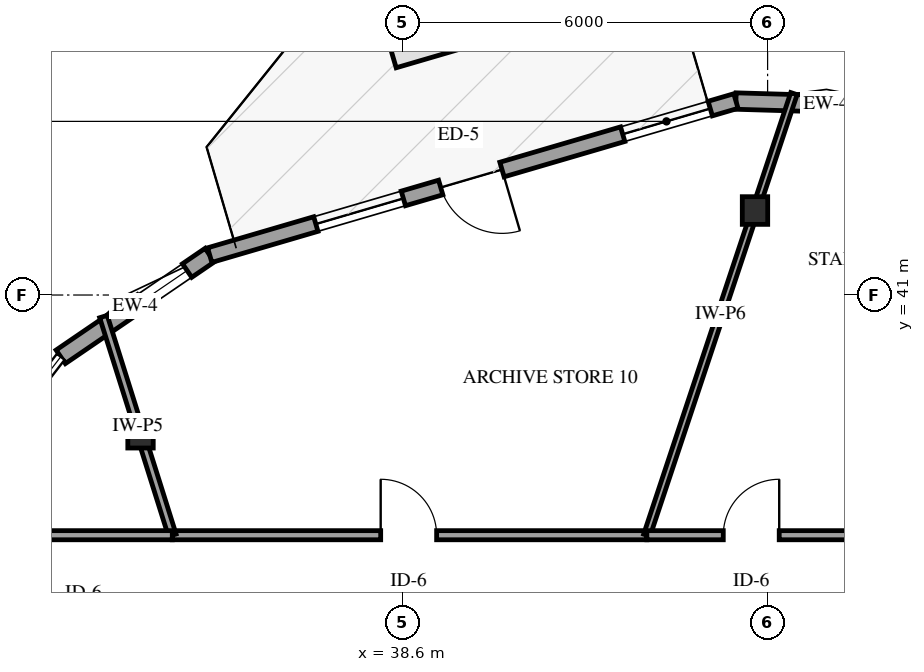
"""IFC4 building model, lengths in metres.
Left out: names, types, materials, properties, quantities, classifications, styles, units other than length and angle.
Written with IfcOpenShell. Run it as: python <this file> out.ifc"""

import sys

from ifc_helpers import new_model, si_unit, direction, frame, frame_2d, origin, origin_2d, place, context, subcontext, project, spatial, rectangle, i_section, extrude, element, fill, save


model = new_model("IFC4")
c1 = context("Model", 3, precision=1e-05, world=origin(), true_north=direction((0.0, 1.0)))
c2 = subcontext(c1, "Body", "Model", "MODEL_VIEW")
j1 = project(units=[si_unit("LENGTHUNIT", "METRE"), si_unit("PLANEANGLEUNIT", "RADIAN")], contexts=[c1])
p1 = place(None, origin())
s1 = spatial("IfcSite", under=j1, at=p1, CompositionType="ELEMENT")
p2 = place(p1, origin())
s2 = spatial("IfcBuilding", under=s1, at=p2, CompositionType="ELEMENT")
p3 = place(p2, frame((0.0, 0.0, 91.3)))
s3 = spatial("IfcBuildingStorey", under=s2, at=p3, CompositionType="ELEMENT", Elevation=91.3)
for number, where, z_axis, x_axis in (
    (1, (44.393, 42.389, 0.0), (0.0, 0.0, 1.0), (1.0, 0.0, 0.0)),
    (2, (34.288, 38.711, 0.0), (0.0, 0.0, 1.0), (1.0, 0.0, 0.0)),
):
    element("IfcColumn", number, at=place(p3, frame(where, z_axis=z_axis, x_axis=x_axis)), inside=s3, PredefinedType="COLUMN", context=c2, shape_type="SweptSolid", body=[
        extrude(i_section(OverallWidth=0.418, OverallDepth=0.455, WebThickness=0.042, FlangeThickness=0.068, FilletRadius=0.038, at=origin_2d()), origin(), (0.0, 0.0, 1.0), 3.9),
    ])
p4 = place(p3, frame((47.044, 44.103, 0.0), z_axis=(0.0, 0.0, 1.0), x_axis=(-0.999570736723, 0.029297479193, 0.0)))
e3 = element("IfcWall", 3, at=p4, inside=s3, PredefinedType="SOLIDWALL", context=c2, shape_type="SweptSolid", body=[
    extrude(rectangle(XDim=2.967, YDim=0.27, at=frame_2d((1.483, 0.0))), origin(), (0.0, 0.0, 1.0), 2.979),
])
p5 = place(p4, frame((0.45, 0.0, 0.75)))
e4 = element("IfcOpeningElement", 4, at=p5, cuts=e3, PredefinedType="OPENING", context=c2, shape_type="SweptSolid", body=[
    extrude(rectangle(XDim=0.9, YDim=1.5, at=frame_2d((0.45, 0.75))), frame((0.0, 0.145, 0.0), z_axis=(0.0, -1.0, 0.0), x_axis=(1.0, 0.0, 0.0)), (0.0, 0.0, 1.0), 0.29),
])
p6 = place(p3, frame((35.425, 41.656, 0.0), z_axis=(0.0, 0.0, 1.0), x_axis=(-0.825884174717, -0.563839808768, 0.0)))
e5 = element("IfcWall", 5, at=p6, inside=s3, PredefinedType="SOLIDWALL", context=c2, shape_type="SweptSolid", body=[
    extrude(rectangle(XDim=2.967, YDim=0.27, at=frame_2d((1.483, 0.0))), origin(), (0.0, 0.0, 1.0), 2.979),
])
p7 = place(p6, frame((0.45, 0.0, 0.75)))
e6 = element("IfcOpeningElement", 6, at=p7, cuts=e5, PredefinedType="OPENING", context=c2, shape_type="SweptSolid", body=[
    extrude(rectangle(XDim=0.9, YDim=1.5, at=frame_2d((0.45, 0.75))), frame((0.0, 0.145, 0.0), z_axis=(0.0, -1.0, 0.0), x_axis=(1.0, 0.0, 0.0)), (0.0, 0.0, 1.0), 0.29),
])
p8 = place(p3, frame((44.079, 44.19, 0.0), z_axis=(0.0, 0.0, 1.0), x_axis=(-0.959709272815, -0.28099486058, 0.0)))
e7 = element("IfcWall", 7, at=p8, inside=s3, PredefinedType="SOLIDWALL", context=c2, shape_type="SweptSolid", body=[
    extrude(rectangle(XDim=9.017, YDim=0.25, at=frame_2d((4.508, 0.0))), origin(), (0.0, 0.0, 1.0), 2.979),
])
p9 = place(p8, frame((4.008, 0.0, 0.0)))
e8 = element("IfcOpeningElement", 8, at=p9, cuts=e7, PredefinedType="OPENING", context=c2, shape_type="SweptSolid", body=[
    extrude(rectangle(XDim=1.05, YDim=2.15, at=frame_2d((0.525, 1.075))), frame((0.0, 0.135, 0.0), z_axis=(0.0, -1.0, 0.0), x_axis=(1.0, 0.0, 0.0)), (0.0, 0.0, 1.0), 0.27),
])
p10 = place(p8, frame((0.44, 0.0, 0.72)))
e9 = element("IfcOpeningElement", 9, at=p10, cuts=e7, PredefinedType="OPENING", context=c2, shape_type="SweptSolid", body=[
    extrude(rectangle(XDim=1.5, YDim=1.7, at=frame_2d((0.75, 0.85))), frame((0.0, 0.135, 0.0), z_axis=(0.0, -1.0, 0.0), x_axis=(1.0, 0.0, 0.0)), (0.0, 0.0, 1.0), 0.27),
])
p11 = place(p8, frame((5.698, 0.0, 0.72)))
e10 = element("IfcOpeningElement", 10, at=p11, cuts=e7, PredefinedType="OPENING", context=c2, shape_type="SweptSolid", body=[
    extrude(rectangle(XDim=1.5, YDim=1.7, at=frame_2d((0.75, 0.85))), frame((0.0, 0.135, 0.0), z_axis=(0.0, -1.0, 0.0), x_axis=(1.0, 0.0, 0.0)), (0.0, 0.0, 1.0), 0.27),
])
p12 = place(p3, frame((34.81, 37.05, 0.0), z_axis=(0.0, 0.0, 1.0), x_axis=(1.0, 0.0, 0.0)))
e11 = element("IfcWall", 11, at=p12, inside=s3, PredefinedType="PARTITIONING", context=c2, shape_type="SweptSolid", body=[
    extrude(rectangle(XDim=7.804, YDim=0.15, at=frame_2d((3.902, 0.0))), origin(), (0.0, 0.0, 1.0), 3.6),
])
p13 = place(p12, frame((3.427, 0.0, 0.0)))
e12 = element("IfcOpeningElement", 12, at=p13, cuts=e11, PredefinedType="OPENING", context=c2, shape_type="SweptSolid", body=[
    extrude(rectangle(XDim=0.92, YDim=2.12, at=frame_2d((0.46, 1.06))), frame((0.0, 0.085, 0.0), z_axis=(0.0, -1.0, 0.0), x_axis=(1.0, 0.0, 0.0)), (0.0, 0.0, 1.0), 0.17),
])
p14 = place(p3, frame((42.614, 37.05, 0.0), z_axis=(0.0, 0.0, 1.0), x_axis=(0.316026813331, 0.948750258633, 0.0)))
e13 = element("IfcWall", 13, at=p14, inside=s3, PredefinedType="PARTITIONING", context=c2, shape_type="SweptSolid", body=[
    extrude(rectangle(XDim=7.654, YDim=0.11, at=frame_2d((3.827, 0.0))), origin(), (0.0, 0.0, 1.0), 2.895),
])
p15 = place(p3, frame((34.81, 37.05, 0.0), z_axis=(0.0, 0.0, 1.0), x_axis=(-0.300291330814, 0.953847533224, 0.0)))
e14 = element("IfcWall", 14, at=p15, inside=s3, PredefinedType="PARTITIONING", context=c2, shape_type="SweptSolid", body=[
    extrude(rectangle(XDim=3.77, YDim=0.13, at=frame_2d((1.885, 0.0))), origin(), (0.0, 0.0, 1.0), 2.895),
])
p16 = place(p3, frame((42.614, 37.05, 0.0), z_axis=(0.0, 0.0, 1.0), x_axis=(1.0, 0.0, 0.0)))
e15 = element("IfcWall", 15, at=p16, inside=s3, PredefinedType="PARTITIONING", context=c2, shape_type="SweptSolid", body=[
    extrude(rectangle(XDim=3.463, YDim=0.15, at=frame_2d((1.731, 0.0))), origin(), (0.0, 0.0, 1.0), 3.6),
])
p17 = place(p16, frame((1.257, 0.0, 0.0)))
e16 = element("IfcOpeningElement", 16, at=p17, cuts=e15, PredefinedType="OPENING", context=c2, shape_type="SweptSolid", body=[
    extrude(rectangle(XDim=0.92, YDim=2.12, at=frame_2d((0.46, 1.06))), frame((0.0, 0.085, 0.0), z_axis=(0.0, -1.0, 0.0), x_axis=(1.0, 0.0, 0.0)), (0.0, 0.0, 1.0), 0.17),
])
p18 = place(p3, frame((32.67, 37.05, 0.0), z_axis=(0.0, 0.0, 1.0), x_axis=(1.0, 0.0, 0.0)))
e17 = element("IfcWall", 17, at=p18, inside=s3, PredefinedType="PARTITIONING", context=c2, shape_type="SweptSolid", body=[
    extrude(rectangle(XDim=2.14, YDim=0.15, at=frame_2d((1.07, 0.0))), origin(), (0.0, 0.0, 1.0), 3.6),
])
p19 = place(p5, origin())
e18 = element("IfcWindow", 18, at=p19, inside=s3, PartitioningType="SINGLE_PANEL", PredefinedType="WINDOW", context=c2, shape_type="SweptSolid", body=[
    extrude(rectangle(XDim=0.9, YDim=1.5, at=frame_2d((0.45, 0.75))), frame((0.0, 0.03, 0.0), z_axis=(0.0, -1.0, 0.0), x_axis=(1.0, 0.0, 0.0)), (0.0, 0.0, 1.0), 0.06),
])
fill(e4, e18)
p20 = place(p7, origin())
e19 = element("IfcWindow", 19, at=p20, inside=s3, PartitioningType="SINGLE_PANEL", PredefinedType="WINDOW", context=c2, shape_type="SweptSolid", body=[
    extrude(rectangle(XDim=0.9, YDim=1.5, at=frame_2d((0.45, 0.75))), frame((0.0, 0.03, 0.0), z_axis=(0.0, -1.0, 0.0), x_axis=(1.0, 0.0, 0.0)), (0.0, 0.0, 1.0), 0.06),
])
fill(e6, e19)
p21 = place(p9, origin())
e20 = element("IfcDoor", 20, at=p21, inside=s3, OperationType="SINGLE_SWING_LEFT", PredefinedType="DOOR", context=c2, shape_type="SweptSolid", body=[
    extrude(rectangle(XDim=1.05, YDim=2.15, at=frame_2d((0.525, 1.075))), frame((0.0, 0.025, 0.0), z_axis=(0.0, -1.0, 0.0), x_axis=(1.0, 0.0, 0.0)), (0.0, 0.0, 1.0), 0.05),
])
fill(e8, e20)
p22 = place(p10, origin())
e21 = element("IfcWindow", 21, at=p22, inside=s3, PartitioningType="SINGLE_PANEL", PredefinedType="WINDOW", context=c2, shape_type="SweptSolid", body=[
    extrude(rectangle(XDim=1.5, YDim=1.7, at=frame_2d((0.75, 0.85))), frame((0.0, 0.03, 0.0), z_axis=(0.0, -1.0, 0.0), x_axis=(1.0, 0.0, 0.0)), (0.0, 0.0, 1.0), 0.06),
])
fill(e9, e21)
p23 = place(p11, origin())
e22 = element("IfcWindow", 22, at=p23, inside=s3, PartitioningType="SINGLE_PANEL", PredefinedType="WINDOW", context=c2, shape_type="SweptSolid", body=[
    extrude(rectangle(XDim=1.5, YDim=1.7, at=frame_2d((0.75, 0.85))), frame((0.0, 0.03, 0.0), z_axis=(0.0, -1.0, 0.0), x_axis=(1.0, 0.0, 0.0)), (0.0, 0.0, 1.0), 0.06),
])
fill(e10, e22)
p24 = place(p13, origin())
e23 = element("IfcDoor", 23, at=p24, inside=s3, OperationType="SINGLE_SWING_LEFT", PredefinedType="DOOR", context=c2, shape_type="SweptSolid", body=[
    extrude(rectangle(XDim=0.92, YDim=2.12, at=frame_2d((0.46, 1.06))), frame((0.0, 0.025, 0.0), z_axis=(0.0, -1.0, 0.0), x_axis=(1.0, 0.0, 0.0)), (0.0, 0.0, 1.0), 0.05),
])
fill(e12, e23)
p25 = place(p17, origin())
e24 = element("IfcDoor", 24, at=p25, inside=s3, OperationType="SINGLE_SWING_RIGHT", PredefinedType="DOOR", context=c2, shape_type="SweptSolid", body=[
    extrude(rectangle(XDim=0.92, YDim=2.12, at=frame_2d((0.46, 1.06))), frame((0.0, 0.025, 0.0), z_axis=(0.0, -1.0, 0.0), x_axis=(1.0, 0.0, 0.0)), (0.0, 0.0, 1.0), 0.05),
])
fill(e16, e24)
save(model, sys.argv[1])
